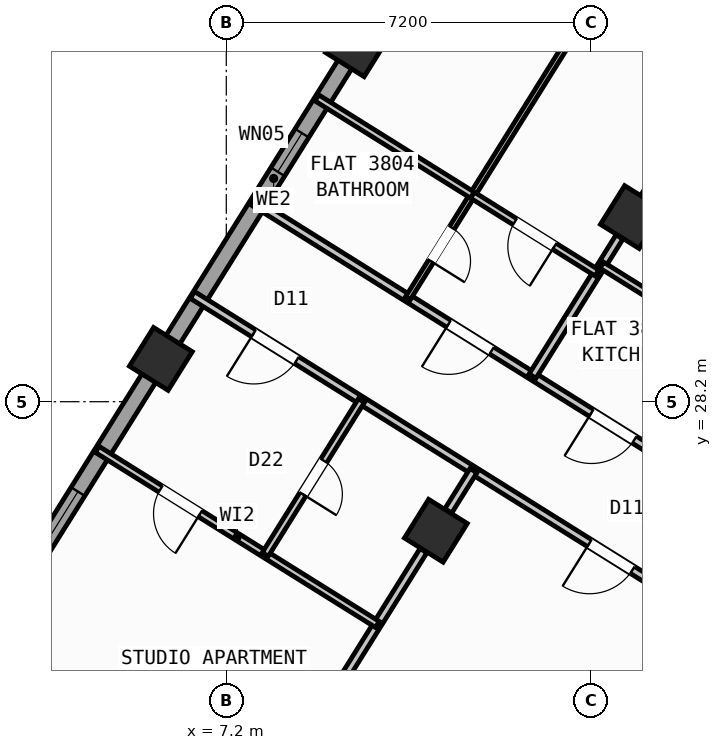
"""IFC4 building model, lengths in metres.
Left out: names, types, materials, properties, quantities, classifications, styles, units other than length and angle.
Written with IfcOpenShell. Run it as: python <this file> out.ifc"""

import sys

from ifc_helpers import new_model, si_unit, direction, frame, frame_2d, origin, origin_2d, place, context, subcontext, project, spatial, rectangle, hollow_rectangle, extrude, source, transform, mapped, element, fill, save


model = new_model("IFC4")
c1 = context("Model", 3, precision=1e-05, world=origin(), true_north=direction((0.0, 1.0)))
c2 = subcontext(c1, "Body", "Model", "MODEL_VIEW")
j1 = project(units=[si_unit("LENGTHUNIT", "METRE"), si_unit("PLANEANGLEUNIT", "RADIAN")], contexts=[c1])
p1 = place(None, origin())
s1 = spatial("IfcSite", under=j1, at=p1, CompositionType="ELEMENT")
p2 = place(p1, origin())
s2 = spatial("IfcBuilding", under=s1, at=p2, CompositionType="ELEMENT")
p3 = place(p2, frame((0.0, 0.0, 151.5)))
s3 = spatial("IfcBuildingStorey", under=s2, at=p3, CompositionType="ELEMENT", Elevation=151.5)
m1 = source(origin(), c2, "Body", "SweptSolid", [
    extrude(hollow_rectangle(XDim=0.9, YDim=0.9, WallThickness=0.036, at=origin_2d()), origin(), (0.0, 0.0, 1.0), 3.6),
])
for number, where, z_axis, x_axis in (
    (1, (15.205, 31.844, 0.0), (0.0, 0.0, 1.0), (-0.848, 0.53, 0.0)),
    (2, (11.336, 25.653, 0.0), (0.0, 0.0, 1.0), (-0.848, 0.53, 0.0)),
    (3, (9.777, 35.235, 0.0), (0.0, 0.0, 1.0), (-0.848, 0.53, 0.0)),
    (4, (5.909, 29.044, 0.0), (0.0, 0.0, 1.0), (-0.848, 0.53, 0.0)),
):
    element("IfcColumn", number, at=place(p3, frame(where, z_axis=z_axis, x_axis=x_axis)), inside=s3, PredefinedType="COLUMN", context=c2, shape_type="MappedRepresentation", body=[
        mapped(m1, transform((0.0, 0.0, 0.0), scale=1.0)),
    ])
p4 = place(p3, frame((29.268, 6.429, 0.0), z_axis=(0.0, 0.0, 1.0), x_axis=(-0.848049971435, 0.529916263149, 0.0)))
e5 = element("IfcWall", 5, at=p4, inside=s3, PredefinedType="STANDARD", context=c2, shape_type="SweptSolid", body=[
    extrude(rectangle(XDim=31.588, YDim=0.32, at=frame_2d((15.794, 0.0))), origin(), (0.0, 0.0, 1.0), 3.35),
])
p5 = place(p4, frame((16.362, 0.0, 0.0)))
e6 = element("IfcOpeningElement", 6, at=p5, cuts=e5, PredefinedType="OPENING", context=c2, shape_type="SweptSolid", body=[
    extrude(rectangle(XDim=1.2, YDim=2.15, at=frame_2d((0.6, 1.075))), frame((0.0, 0.17, 0.0), z_axis=(0.0, -1.0, 0.0), x_axis=(1.0, 0.0, 0.0)), (0.0, 0.0, 1.0), 0.34),
])
p6 = place(p4, frame((2.989, 0.0, 0.8)))
e7 = element("IfcOpeningElement", 7, at=p6, cuts=e5, PredefinedType="OPENING", context=c2, shape_type="SweptSolid", body=[
    extrude(rectangle(XDim=2.1, YDim=1.55, at=frame_2d((1.05, 0.775))), frame((0.0, 0.17, 0.0), z_axis=(0.0, -1.0, 0.0), x_axis=(1.0, 0.0, 0.0)), (0.0, 0.0, 1.0), 0.34),
])
p7 = place(p4, frame((8.359, 0.0, 0.8)))
e8 = element("IfcOpeningElement", 8, at=p7, cuts=e5, PredefinedType="OPENING", context=c2, shape_type="SweptSolid", body=[
    extrude(rectangle(XDim=2.1, YDim=1.55, at=frame_2d((1.05, 0.775))), frame((0.0, 0.17, 0.0), z_axis=(0.0, -1.0, 0.0), x_axis=(1.0, 0.0, 0.0)), (0.0, 0.0, 1.0), 0.34),
])
p8 = place(p4, frame((13.284, 0.0, 0.95)))
e9 = element("IfcOpeningElement", 9, at=p8, cuts=e5, PredefinedType="OPENING", context=c2, shape_type="SweptSolid", body=[
    extrude(rectangle(XDim=1.2, YDim=1.4, at=frame_2d((0.6, 0.7))), frame((0.0, 0.17, 0.0), z_axis=(0.0, -1.0, 0.0), x_axis=(1.0, 0.0, 0.0)), (0.0, 0.0, 1.0), 0.34),
])
p9 = place(p4, frame((20.259, 0.0, 0.95)))
e10 = element("IfcOpeningElement", 10, at=p9, cuts=e5, PredefinedType="OPENING", context=c2, shape_type="SweptSolid", body=[
    extrude(rectangle(XDim=1.2, YDim=1.4, at=frame_2d((0.6, 0.7))), frame((0.0, 0.17, 0.0), z_axis=(0.0, -1.0, 0.0), x_axis=(1.0, 0.0, 0.0)), (0.0, 0.0, 1.0), 0.34),
])
p10 = place(p4, frame((22.929, 0.0, 0.95)))
e11 = element("IfcOpeningElement", 11, at=p10, cuts=e5, PredefinedType="OPENING", context=c2, shape_type="SweptSolid", body=[
    extrude(rectangle(XDim=1.2, YDim=1.4, at=frame_2d((0.6, 0.7))), frame((0.0, 0.17, 0.0), z_axis=(0.0, -1.0, 0.0), x_axis=(1.0, 0.0, 0.0)), (0.0, 0.0, 1.0), 0.34),
])
p11 = place(p4, frame((27.481, 0.0, 0.8)))
e12 = element("IfcOpeningElement", 12, at=p11, cuts=e5, PredefinedType="OPENING", context=c2, shape_type="SweptSolid", body=[
    extrude(rectangle(XDim=2.1, YDim=1.55, at=frame_2d((1.05, 0.775))), frame((0.0, 0.17, 0.0), z_axis=(0.0, -1.0, 0.0), x_axis=(1.0, 0.0, 0.0)), (0.0, 0.0, 1.0), 0.34),
])
p12 = place(p3, frame((2.415, 23.452, 0.0), z_axis=(0.0, 0.0, 1.0), x_axis=(0.52991049553, 0.848053575387, 0.0)))
e13 = element("IfcWall", 13, at=p12, inside=s3, PredefinedType="STANDARD", context=c2, shape_type="SweptSolid", body=[
    extrude(rectangle(XDim=21.587, YDim=0.32, at=frame_2d((10.794, 0.0))), origin(), (0.0, 0.0, 1.0), 2.775),
])
p13 = place(p12, frame((1.406, 0.0, 0.8)))
e14 = element("IfcOpeningElement", 14, at=p13, cuts=e13, PredefinedType="OPENING", context=c2, shape_type="SweptSolid", body=[
    extrude(rectangle(XDim=2.1, YDim=1.55, at=frame_2d((1.05, 0.775))), frame((0.0, 0.17, 0.0), z_axis=(0.0, -1.0, 0.0), x_axis=(1.0, 0.0, 0.0)), (0.0, 0.0, 1.0), 0.34),
])
p14 = place(p12, frame((10.949, 0.0, 1.0)))
e15 = element("IfcOpeningElement", 15, at=p14, cuts=e13, PredefinedType="OPENING", context=c2, shape_type="SweptSolid", body=[
    extrude(rectangle(XDim=0.9, YDim=1.25, at=frame_2d((0.45, 0.625))), frame((0.0, 0.17, 0.0), z_axis=(0.0, -1.0, 0.0), x_axis=(1.0, 0.0, 0.0)), (0.0, 0.0, 1.0), 0.34),
])
p15 = place(p12, frame((15.369, 0.0, 0.85)))
e16 = element("IfcOpeningElement", 16, at=p15, cuts=e13, PredefinedType="OPENING", context=c2, shape_type="SweptSolid", body=[
    extrude(rectangle(XDim=1.5, YDim=1.5, at=frame_2d((0.75, 0.75))), frame((0.0, 0.17, 0.0), z_axis=(0.0, -1.0, 0.0), x_axis=(1.0, 0.0, 0.0)), (0.0, 0.0, 1.0), 0.34),
])
p16 = place(p12, frame((18.219, 0.0, 0.85)))
e17 = element("IfcOpeningElement", 17, at=p16, cuts=e13, PredefinedType="OPENING", context=c2, shape_type="SweptSolid", body=[
    extrude(rectangle(XDim=1.5, YDim=1.5, at=frame_2d((0.75, 0.75))), frame((0.0, 0.17, 0.0), z_axis=(0.0, -1.0, 0.0), x_axis=(1.0, 0.0, 0.0)), (0.0, 0.0, 1.0), 0.34),
])
p17 = place(p3, frame((14.138, 41.825, 0.0), z_axis=(0.0, 0.0, 1.0), x_axis=(0.848046498049, -0.529921821731, 0.0)))
e18 = element("IfcWall", 18, at=p17, inside=s3, PredefinedType="STANDARD", context=c2, shape_type="SweptSolid", body=[
    extrude(rectangle(XDim=31.588, YDim=0.32, at=frame_2d((15.794, 0.0))), origin(), (0.0, 0.0, 1.0), 3.35),
])
p18 = place(p17, frame((9.792, 0.0, 0.0)))
e19 = element("IfcOpeningElement", 19, at=p18, cuts=e18, PredefinedType="OPENING", context=c2, shape_type="SweptSolid", body=[
    extrude(rectangle(XDim=1.05, YDim=2.15, at=frame_2d((0.525, 1.075))), frame((0.0, 0.17, 0.0), z_axis=(0.0, -1.0, 0.0), x_axis=(1.0, 0.0, 0.0)), (0.0, 0.0, 1.0), 0.34),
])
p19 = place(p17, frame((0.791, 0.0, 0.85)))
e20 = element("IfcOpeningElement", 20, at=p19, cuts=e18, PredefinedType="OPENING", context=c2, shape_type="SweptSolid", body=[
    extrude(rectangle(XDim=1.8, YDim=1.5, at=frame_2d((0.9, 0.75))), frame((0.0, 0.17, 0.0), z_axis=(0.0, -1.0, 0.0), x_axis=(1.0, 0.0, 0.0)), (0.0, 0.0, 1.0), 0.34),
])
p20 = place(p17, frame((3.996, 0.0, 0.95)))
e21 = element("IfcOpeningElement", 21, at=p20, cuts=e18, PredefinedType="OPENING", context=c2, shape_type="SweptSolid", body=[
    extrude(rectangle(XDim=1.2, YDim=1.4, at=frame_2d((0.6, 0.7))), frame((0.0, 0.17, 0.0), z_axis=(0.0, -1.0, 0.0), x_axis=(1.0, 0.0, 0.0)), (0.0, 0.0, 1.0), 0.34),
])
p21 = place(p17, frame((13.874, 0.0, 0.85)))
e22 = element("IfcOpeningElement", 22, at=p21, cuts=e18, PredefinedType="OPENING", context=c2, shape_type="SweptSolid", body=[
    extrude(rectangle(XDim=1.5, YDim=1.5, at=frame_2d((0.75, 0.75))), frame((0.0, 0.17, 0.0), z_axis=(0.0, -1.0, 0.0), x_axis=(1.0, 0.0, 0.0)), (0.0, 0.0, 1.0), 0.34),
])
p22 = place(p17, frame((17.104, 0.0, 1.0)))
e23 = element("IfcOpeningElement", 23, at=p22, cuts=e18, PredefinedType="OPENING", context=c2, shape_type="SweptSolid", body=[
    extrude(rectangle(XDim=0.9, YDim=1.25, at=frame_2d((0.45, 0.625))), frame((0.0, 0.17, 0.0), z_axis=(0.0, -1.0, 0.0), x_axis=(1.0, 0.0, 0.0)), (0.0, 0.0, 1.0), 0.34),
])
p23 = place(p17, frame((22.069, 0.0, 1.0)))
e24 = element("IfcOpeningElement", 24, at=p23, cuts=e18, PredefinedType="OPENING", context=c2, shape_type="SweptSolid", body=[
    extrude(rectangle(XDim=0.9, YDim=1.25, at=frame_2d((0.45, 0.625))), frame((0.0, 0.17, 0.0), z_axis=(0.0, -1.0, 0.0), x_axis=(1.0, 0.0, 0.0)), (0.0, 0.0, 1.0), 0.34),
])
p24 = place(p17, frame((27.519, 0.0, 1.0)))
e25 = element("IfcOpeningElement", 25, at=p24, cuts=e18, PredefinedType="OPENING", context=c2, shape_type="SweptSolid", body=[
    extrude(rectangle(XDim=0.9, YDim=1.25, at=frame_2d((0.45, 0.625))), frame((0.0, 0.17, 0.0), z_axis=(0.0, -1.0, 0.0), x_axis=(1.0, 0.0, 0.0)), (0.0, 0.0, 1.0), 0.34),
])
p25 = place(p3, frame((21.885, 23.306, 0.0), z_axis=(0.0, 0.0, 1.0), x_axis=(-0.848052408131, 0.529912363569, 0.0)))
e26 = element("IfcWall", 26, at=p25, inside=s3, PredefinedType="PARTITIONING", context=c2, shape_type="SweptSolid", body=[
    extrude(rectangle(XDim=16.73, YDim=0.16, at=frame_2d((8.365, 0.0))), origin(), (0.0, 0.0, 1.0), 3.34),
])
p26 = place(p25, frame((1.395, 0.0, 0.0)))
e27 = element("IfcOpeningElement", 27, at=p26, cuts=e26, PredefinedType="OPENING", context=c2, shape_type="SweptSolid", body=[
    extrude(rectangle(XDim=1.0, YDim=2.1, at=frame_2d((0.5, 1.05))), frame((0.0, 0.09, 0.0), z_axis=(0.0, -1.0, 0.0), x_axis=(1.0, 0.0, 0.0)), (0.0, 0.0, 1.0), 0.18),
])
p27 = place(p25, frame((7.82, 0.0, 0.0)))
e28 = element("IfcOpeningElement", 28, at=p27, cuts=e26, PredefinedType="OPENING", context=c2, shape_type="SweptSolid", body=[
    extrude(rectangle(XDim=1.0, YDim=2.1, at=frame_2d((0.5, 1.05))), frame((0.0, 0.09, 0.0), z_axis=(0.0, -1.0, 0.0), x_axis=(1.0, 0.0, 0.0)), (0.0, 0.0, 1.0), 0.18),
])
p28 = place(p25, frame((11.14, 0.0, 0.0)))
e29 = element("IfcOpeningElement", 29, at=p28, cuts=e26, PredefinedType="OPENING", context=c2, shape_type="SweptSolid", body=[
    extrude(rectangle(XDim=1.0, YDim=2.1, at=frame_2d((0.5, 1.05))), frame((0.0, 0.09, 0.0), z_axis=(0.0, -1.0, 0.0), x_axis=(1.0, 0.0, 0.0)), (0.0, 0.0, 1.0), 0.18),
])
p29 = place(p3, frame((20.719, 21.44, 0.0), z_axis=(0.0, 0.0, 1.0), x_axis=(-0.848048310262, 0.529918921593, 0.0)))
e30 = element("IfcWall", 30, at=p29, inside=s3, PredefinedType="PARTITIONING", context=c2, shape_type="SweptSolid", body=[
    extrude(rectangle(XDim=16.73, YDim=0.16, at=frame_2d((8.365, 0.0))), origin(), (0.0, 0.0, 1.0), 3.34),
])
p30 = place(p29, frame((2.22, 0.0, 0.0)))
e31 = element("IfcOpeningElement", 31, at=p30, cuts=e30, PredefinedType="OPENING", context=c2, shape_type="SweptSolid", body=[
    extrude(rectangle(XDim=0.86, YDim=2.05, at=frame_2d((0.43, 1.025))), frame((0.0, 0.09, 0.0), z_axis=(0.0, -1.0, 0.0), x_axis=(1.0, 0.0, 0.0)), (0.0, 0.0, 1.0), 0.18),
])
p31 = place(p29, frame((6.49, 0.0, 0.0)))
e32 = element("IfcOpeningElement", 32, at=p31, cuts=e30, PredefinedType="OPENING", context=c2, shape_type="SweptSolid", body=[
    extrude(rectangle(XDim=1.0, YDim=2.1, at=frame_2d((0.5, 1.05))), frame((0.0, 0.09, 0.0), z_axis=(0.0, -1.0, 0.0), x_axis=(1.0, 0.0, 0.0)), (0.0, 0.0, 1.0), 0.18),
])
p32 = place(p29, frame((14.304, 0.0, 0.0)))
e33 = element("IfcOpeningElement", 33, at=p32, cuts=e30, PredefinedType="OPENING", context=c2, shape_type="SweptSolid", body=[
    extrude(rectangle(XDim=1.0, YDim=2.1, at=frame_2d((0.5, 1.05))), frame((0.0, 0.09, 0.0), z_axis=(0.0, -1.0, 0.0), x_axis=(1.0, 0.0, 0.0)), (0.0, 0.0, 1.0), 0.18),
])
p33 = place(p3, frame((12.078, 26.84, 0.0), z_axis=(0.0, 0.0, 1.0), x_axis=(-0.529952145338, -0.848027548876, 0.0)))
e34 = element("IfcWall", 34, at=p33, inside=s3, PredefinedType="PARTITIONING", context=c2, shape_type="SweptSolid", body=[
    extrude(rectangle(XDim=0.938, YDim=0.16, at=frame_2d((0.469, 0.0))), origin(), (0.0, 0.0, 1.0), 2.775),
])
p34 = place(p3, frame((11.091, 25.261, 0.0), z_axis=(0.0, 0.0, 1.0), x_axis=(-0.52994257524, -0.848033529377, 0.0)))
e35 = element("IfcWall", 35, at=p34, inside=s3, PredefinedType="PARTITIONING", context=c2, shape_type="SweptSolid", body=[
    extrude(rectangle(XDim=5.451, YDim=0.16, at=frame_2d((2.726, 0.0))), origin(), (0.0, 0.0, 1.0), 2.775),
])
p35 = place(p3, frame((10.181, 23.804, 0.0), z_axis=(0.0, 0.0, 1.0), x_axis=(-0.848065614912, 0.529891227332, 0.0)))
e36 = element("IfcWall", 36, at=p35, inside=s3, PredefinedType="PLUMBINGWALL", context=c2, shape_type="SweptSolid", body=[
    extrude(rectangle(XDim=6.52, YDim=0.14, at=frame_2d((3.26, 0.0))), origin(), (0.0, 0.0, 1.0), 3.34),
])
p36 = place(p35, frame((4.124, 0.0, 0.0)))
e37 = element("IfcOpeningElement", 37, at=p36, cuts=e36, PredefinedType="OPENING", context=c2, shape_type="SweptSolid", body=[
    extrude(rectangle(XDim=0.92, YDim=2.08, at=frame_2d((0.46, 1.04))), frame((0.0, 0.08, 0.0), z_axis=(0.0, -1.0, 0.0), x_axis=(1.0, 0.0, 0.0)), (0.0, 0.0, 1.0), 0.16),
])
p37 = place(p3, frame((9.866, 28.222, 0.0), z_axis=(0.0, 0.0, 1.0), x_axis=(-0.529876336437, -0.84807491891, 0.0)))
e38 = element("IfcWall", 38, at=p37, inside=s3, PredefinedType="PLUMBINGWALL", context=c2, shape_type="SweptSolid", body=[
    extrude(rectangle(XDim=3.58, YDim=0.14, at=frame_2d((1.79, 0.0))), origin(), (0.0, 0.0, 1.0), 3.34),
])
p38 = place(p37, frame((1.4, 0.0, 0.0)))
e39 = element("IfcOpeningElement", 39, at=p38, cuts=e38, PredefinedType="OPENING", context=c2, shape_type="SweptSolid", body=[
    extrude(rectangle(XDim=0.78, YDim=2.05, at=frame_2d((0.39, 1.025))), frame((0.0, 0.08, 0.0), z_axis=(0.0, -1.0, 0.0), x_axis=(1.0, 0.0, 0.0)), (0.0, 0.0, 1.0), 0.16),
])
p39 = place(p3, frame((18.828, 37.643, 0.0), z_axis=(0.0, 0.0, 1.0), x_axis=(-0.529930102756, -0.848041323399, 0.0)))
e40 = element("IfcWall", 40, at=p39, inside=s3, PredefinedType="PARTITIONING", context=c2, shape_type="SweptSolid", body=[
    extrude(rectangle(XDim=6.376, YDim=0.16, at=frame_2d((3.188, 0.0))), origin(), (0.0, 0.0, 1.0), 2.775),
])
p40 = place(p3, frame((14.96, 31.452, 0.0), z_axis=(0.0, 0.0, 1.0), x_axis=(-0.529924383291, -0.848044897393, 0.0)))
e41 = element("IfcWall", 41, at=p40, inside=s3, PredefinedType="PARTITIONING", context=c2, shape_type="SweptSolid", body=[
    extrude(rectangle(XDim=3.238, YDim=0.16, at=frame_2d((1.619, 0.0))), origin(), (0.0, 0.0, 1.0), 2.775),
])
p41 = place(p3, frame((20.039, 27.502, 0.0), z_axis=(0.0, 0.0, 1.0), x_axis=(-0.848039019877, 0.529933789039, 0.0)))
e42 = element("IfcWall", 42, at=p41, inside=s3, PredefinedType="PLUMBINGWALL", context=c2, shape_type="SweptSolid", body=[
    extrude(rectangle(XDim=6.4, YDim=0.14, at=frame_2d((3.2, 0.0))), origin(), (0.0, 0.0, 1.0), 3.34),
])
p42 = place(p41, frame((2.824, 0.0, 0.0)))
e43 = element("IfcOpeningElement", 43, at=p42, cuts=e42, PredefinedType="OPENING", context=c2, shape_type="SweptSolid", body=[
    extrude(rectangle(XDim=0.78, YDim=2.05, at=frame_2d((0.39, 1.025))), frame((0.0, 0.08, 0.0), z_axis=(0.0, -1.0, 0.0), x_axis=(1.0, 0.0, 0.0)), (0.0, 0.0, 1.0), 0.16),
])
p43 = place(p3, frame((16.995, 40.182, 0.0), z_axis=(0.0, 0.0, 1.0), x_axis=(-0.529927783988, -0.848042772363, 0.0)))
e44 = element("IfcWall", 44, at=p43, inside=s3, PredefinedType="PARTITIONING", context=c2, shape_type="SweptSolid", body=[
    extrude(rectangle(XDim=11.72, YDim=0.11, at=frame_2d((5.86, 0.0))), origin(), (0.0, 0.0, 1.0), 3.34),
])
p44 = place(p43, frame((10.08, 0.0, 0.0)))
e45 = element("IfcOpeningElement", 45, at=p44, cuts=e44, PredefinedType="OPENING", context=c2, shape_type="SweptSolid", body=[
    extrude(rectangle(XDim=0.78, YDim=2.05, at=frame_2d((0.39, 1.025))), frame((0.0, 0.065, 0.0), z_axis=(0.0, -1.0, 0.0), x_axis=(1.0, 0.0, 0.0)), (0.0, 0.0, 1.0), 0.13),
])
p45 = place(p43, frame((4.2, 0.0, 0.0)))
e46 = element("IfcOpeningElement", 46, at=p45, cuts=e44, PredefinedType="OPENING", context=c2, shape_type="SweptSolid", body=[
    extrude(rectangle(XDim=0.92, YDim=2.08, at=frame_2d((0.46, 1.04))), frame((0.0, 0.065, 0.0), z_axis=(0.0, -1.0, 0.0), x_axis=(1.0, 0.0, 0.0)), (0.0, 0.0, 1.0), 0.13),
])
p46 = place(p3, frame((14.516, 30.741, 0.0), z_axis=(0.0, 0.0, 1.0), x_axis=(-0.848059786386, 0.529900555496, 0.0)))
e47 = element("IfcWall", 47, at=p46, inside=s3, PredefinedType="PLUMBINGWALL", context=c2, shape_type="SweptSolid", body=[
    extrude(rectangle(XDim=2.9, YDim=0.14, at=frame_2d((1.45, 0.0))), origin(), (0.0, 0.0, 1.0), 3.34),
])
p47 = place(p46, frame((0.99, 0.0, 0.0)))
e48 = element("IfcOpeningElement", 48, at=p47, cuts=e47, PredefinedType="OPENING", context=c2, shape_type="SweptSolid", body=[
    extrude(rectangle(XDim=0.92, YDim=2.08, at=frame_2d((0.46, 1.04))), frame((0.0, 0.08, 0.0), z_axis=(0.0, -1.0, 0.0), x_axis=(1.0, 0.0, 0.0)), (0.0, 0.0, 1.0), 0.16),
])
p48 = place(p3, frame((12.056, 32.278, 0.0), z_axis=(0.0, 0.0, 1.0), x_axis=(-0.848039976902, 0.529932257535, 0.0)))
e49 = element("IfcWall", 49, at=p48, inside=s3, PredefinedType="PLUMBINGWALL", context=c2, shape_type="SweptSolid", body=[
    extrude(rectangle(XDim=3.62, YDim=0.14, at=frame_2d((1.81, 0.0))), origin(), (0.0, 0.0, 1.0), 3.34),
])
m2 = source(origin(), c2, "Body", "SweptSolid", [
    extrude(rectangle(XDim=2.1, YDim=1.55, at=frame_2d((1.05, 0.775))), frame((0.0, 0.03, 0.0), z_axis=(0.0, -1.0, 0.0), x_axis=(1.0, 0.0, 0.0)), (0.0, 0.0, 1.0), 0.06),
])
p49 = place(p13, origin())
e50 = element("IfcWindow", 50, at=p49, inside=s3, PartitioningType="SINGLE_PANEL", PredefinedType="WINDOW", context=c2, shape_type="MappedRepresentation", body=[
    mapped(m2, transform((0.0, 0.0, 0.0), scale=1.0)),
])
fill(e14, e50)
m3 = source(origin(), c2, "Body", "SweptSolid", [
    extrude(rectangle(XDim=0.9, YDim=1.25, at=frame_2d((0.45, 0.625))), frame((0.0, 0.03, 0.0), z_axis=(0.0, -1.0, 0.0), x_axis=(1.0, 0.0, 0.0)), (0.0, 0.0, 1.0), 0.06),
])
p50 = place(p14, origin())
e51 = element("IfcWindow", 51, at=p50, inside=s3, PartitioningType="SINGLE_PANEL", PredefinedType="WINDOW", context=c2, shape_type="MappedRepresentation", body=[
    mapped(m3, transform((0.0, 0.0, 0.0), scale=1.0)),
])
fill(e15, e51)
m4 = source(origin(), c2, "Body", "SweptSolid", [
    extrude(rectangle(XDim=1.0, YDim=2.1, at=frame_2d((0.5, 1.05))), frame((0.0, 0.025, 0.0), z_axis=(0.0, -1.0, 0.0), x_axis=(1.0, 0.0, 0.0)), (0.0, 0.0, 1.0), 0.05),
])
p51 = place(p31, origin())
e52 = element("IfcDoor", 52, at=p51, inside=s3, OperationType="SINGLE_SWING_RIGHT", PredefinedType="DOOR", context=c2, shape_type="MappedRepresentation", body=[
    mapped(m4, transform((0.0, 0.0, 0.0), scale=1.0)),
])
fill(e32, e52)
p52 = place(p32, origin())
e53 = element("IfcDoor", 53, at=p52, inside=s3, OperationType="SINGLE_SWING_RIGHT", PredefinedType="DOOR", context=c2, shape_type="MappedRepresentation", body=[
    mapped(m4, transform((0.0, 0.0, 0.0), scale=1.0)),
])
fill(e33, e53)
m5 = source(origin(), c2, "Body", "SweptSolid", [
    extrude(rectangle(XDim=0.92, YDim=2.08, at=frame_2d((0.46, 1.04))), frame((0.0, 0.025, 0.0), z_axis=(0.0, -1.0, 0.0), x_axis=(1.0, 0.0, 0.0)), (0.0, 0.0, 1.0), 0.05),
])
p53 = place(p36, origin())
e54 = element("IfcDoor", 54, at=p53, inside=s3, OperationType="SINGLE_SWING_LEFT", PredefinedType="DOOR", context=c2, shape_type="MappedRepresentation", body=[
    mapped(m5, transform((0.0, 0.0, 0.0), scale=1.0)),
])
fill(e37, e54)
m6 = source(origin(), c2, "Body", "SweptSolid", [
    extrude(rectangle(XDim=0.78, YDim=2.05, at=frame_2d((0.39, 1.025))), frame((0.0, 0.025, 0.0), z_axis=(0.0, -1.0, 0.0), x_axis=(1.0, 0.0, 0.0)), (0.0, 0.0, 1.0), 0.05),
])
p54 = place(p38, origin())
e55 = element("IfcDoor", 55, at=p54, inside=s3, OperationType="SINGLE_SWING_RIGHT", PredefinedType="DOOR", context=c2, shape_type="MappedRepresentation", body=[
    mapped(m6, transform((0.0, 0.0, 0.0), scale=1.0)),
])
fill(e39, e55)
p55 = place(p27, origin())
e56 = element("IfcDoor", 56, at=p55, inside=s3, OperationType="SINGLE_SWING_RIGHT", PredefinedType="DOOR", context=c2, shape_type="MappedRepresentation", body=[
    mapped(m4, transform((0.0, 0.0, 0.0), scale=1.0)),
])
fill(e28, e56)
p56 = place(p28, origin())
e57 = element("IfcDoor", 57, at=p56, inside=s3, OperationType="SINGLE_SWING_RIGHT", PredefinedType="DOOR", context=c2, shape_type="MappedRepresentation", body=[
    mapped(m4, transform((0.0, 0.0, 0.0), scale=1.0)),
])
fill(e29, e57)
p57 = place(p47, origin())
e58 = element("IfcDoor", 58, at=p57, inside=s3, OperationType="SINGLE_SWING_LEFT", PredefinedType="DOOR", context=c2, shape_type="MappedRepresentation", body=[
    mapped(m5, transform((0.0, 0.0, 0.0), scale=1.0)),
])
fill(e48, e58)
p58 = place(p44, origin())
e59 = element("IfcDoor", 59, at=p58, inside=s3, OperationType="SINGLE_SWING_RIGHT", PredefinedType="DOOR", context=c2, shape_type="MappedRepresentation", body=[
    mapped(m6, transform((0.0, 0.0, 0.0), scale=1.0)),
])
fill(e45, e59)
save(model, sys.argv[1])
